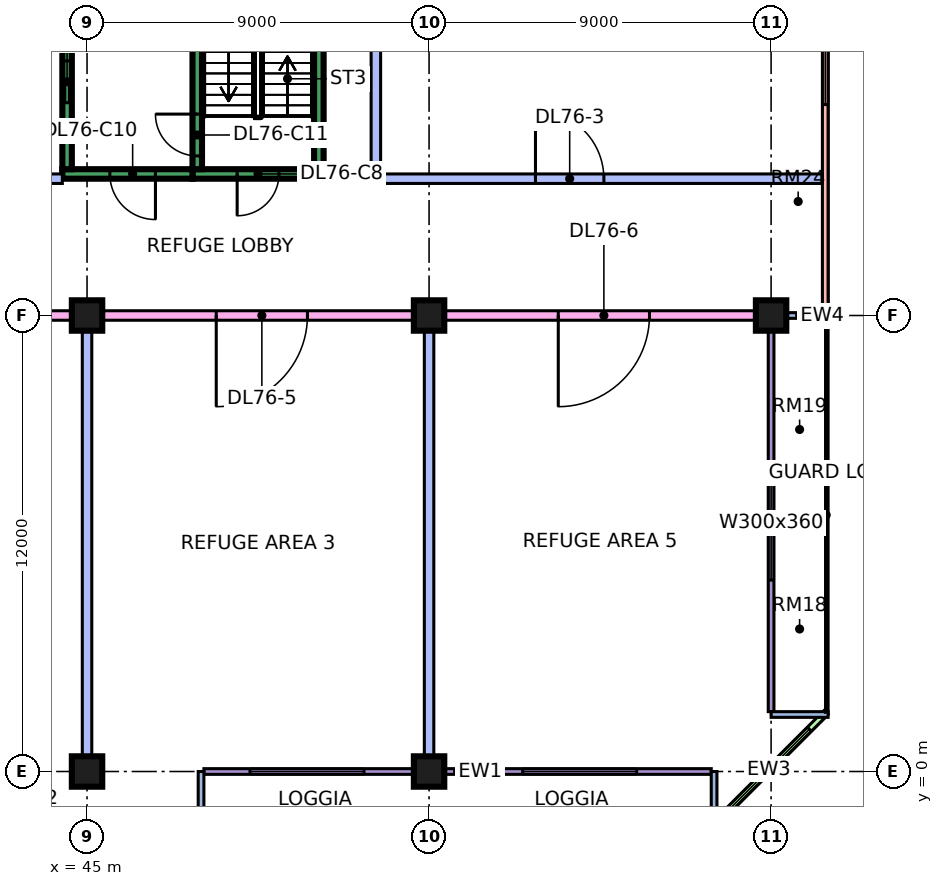
"""IFC4 building model, lengths in metres.
Left out: names, types, materials, properties, quantities, classifications, styles, units other than length and angle.
Written with IfcOpenShell. Run it as: python <this file> out.ifc"""

import sys

from ifc_helpers import new_model, si_unit, direction, frame, frame_2d, origin, origin_2d, place, context, subcontext, project, spatial, rectangle, extrude, element, fill, save


model = new_model("IFC4")
c1 = context("Model", 3, precision=1e-05, world=origin(), true_north=direction((0.0, 1.0)))
c2 = subcontext(c1, "Body", "Model", "MODEL_VIEW")
j1 = project(units=[si_unit("LENGTHUNIT", "METRE"), si_unit("PLANEANGLEUNIT", "RADIAN")], contexts=[c1])
p1 = place(None, origin())
s1 = spatial("IfcSite", under=j1, at=p1, CompositionType="ELEMENT")
p2 = place(p1, origin())
s2 = spatial("IfcBuilding", under=s1, at=p2, CompositionType="ELEMENT")
p3 = place(p2, frame((0.0, 0.0, 322.15)))
s3 = spatial("IfcBuildingStorey", under=s2, at=p3, CompositionType="ELEMENT", Elevation=322.15)
for number, where, z_axis, x_axis in (
    (1, (45.0, 0.0, 0.0), (0.0, 0.0, 1.0), (1.0, 0.0, 0.0)),
    (2, (45.0, 12.0, 0.0), (0.0, 0.0, 1.0), (1.0, 0.0, 0.0)),
    (3, (54.0, 0.0, 0.0), (0.0, 0.0, 1.0), (1.0, 0.0, 0.0)),
    (4, (54.0, 12.0, 0.0), (0.0, 0.0, 1.0), (1.0, 0.0, 0.0)),
    (5, (63.0, 12.0, 0.0), (0.0, 0.0, 1.0), (1.0, 0.0, 0.0)),
):
    element("IfcColumn", number, at=place(p3, frame(where, z_axis=z_axis, x_axis=x_axis)), inside=s3, PredefinedType="COLUMN", context=c2, shape_type="SweptSolid", body=[
        extrude(rectangle(XDim=0.8, YDim=0.8, at=origin_2d()), origin(), (0.0, 0.0, 1.0), 5.5),
    ])
p4 = place(p3, frame((47.775, 15.725, 0.0), z_axis=(0.0, 0.0, 1.0), x_axis=(1.0, 0.0, 0.0)))
e6 = element("IfcWall", 6, at=p4, inside=s3, PredefinedType="SHEAR", context=c2, shape_type="SweptSolid", body=[
    extrude(rectangle(XDim=3.45, YDim=0.25, at=frame_2d((1.725, 0.0))), origin(), (0.0, 0.0, 1.0), 5.5),
])
p5 = place(p4, frame((1.175, 0.0, 0.0)))
e7 = element("IfcOpeningElement", 7, at=p5, cuts=e6, PredefinedType="OPENING", context=c2, shape_type="SweptSolid", body=[
    extrude(rectangle(XDim=1.1, YDim=2.2, at=frame_2d((0.55, 1.1))), frame((0.0, 0.135, 0.0), z_axis=(0.0, -1.0, 0.0), x_axis=(1.0, 0.0, 0.0)), (0.0, 0.0, 1.0), 0.27),
])
p6 = place(p3, frame((47.9, 15.85, 0.0), z_axis=(0.0, 0.0, 1.0), x_axis=(0.0, 1.0, 0.0)))
e8 = element("IfcWall", 8, at=p6, inside=s3, PredefinedType="SHEAR", context=c2, shape_type="SweptSolid", body=[
    extrude(rectangle(XDim=6.5, YDim=0.25, at=frame_2d((3.25, 0.0))), origin(), (0.0, 0.0, 1.0), 5.5),
])
p7 = place(p6, frame((0.35, 0.0, 0.0)))
e9 = element("IfcOpeningElement", 9, at=p7, cuts=e8, PredefinedType="OPENING", context=c2, shape_type="SweptSolid", body=[
    extrude(rectangle(XDim=1.1, YDim=2.2, at=frame_2d((0.55, 1.1))), frame((0.0, 0.135, 0.0), z_axis=(0.0, -1.0, 0.0), x_axis=(1.0, 0.0, 0.0)), (0.0, 0.0, 1.0), 0.27),
])
p8 = place(p3, frame((51.1, 15.85, 0.0), z_axis=(0.0, 0.0, 1.0), x_axis=(0.0, 1.0, 0.0)))
e10 = element("IfcWall", 10, at=p8, inside=s3, PredefinedType="SHEAR", context=c2, shape_type="SweptSolid", body=[
    extrude(rectangle(XDim=6.5, YDim=0.25, at=frame_2d((3.25, 0.0))), origin(), (0.0, 0.0, 1.0), 5.5),
])
p9 = place(p3, frame((44.35, 15.725, 0.0), z_axis=(0.0, 0.0, 1.0), x_axis=(1.0, 0.0, 0.0)))
e11 = element("IfcWall", 11, at=p9, inside=s3, PredefinedType="SHEAR", context=c2, shape_type="SweptSolid", body=[
    extrude(rectangle(XDim=3.425, YDim=0.25, at=frame_2d((1.712, 0.0))), origin(), (0.0, 0.0, 1.0), 5.5),
])
p10 = place(p9, frame((1.25, 0.0, 0.0)))
e12 = element("IfcOpeningElement", 12, at=p10, cuts=e11, PredefinedType="OPENING", context=c2, shape_type="SweptSolid", body=[
    extrude(rectangle(XDim=1.2, YDim=2.2, at=frame_2d((0.6, 1.1))), frame((0.0, 0.135, 0.0), z_axis=(0.0, -1.0, 0.0), x_axis=(1.0, 0.0, 0.0)), (0.0, 0.0, 1.0), 0.27),
])
p11 = place(p3, frame((44.475, 15.85, 0.0), z_axis=(0.0, 0.0, 1.0), x_axis=(0.0, 1.0, 0.0)))
e13 = element("IfcWall", 13, at=p11, inside=s3, PredefinedType="SHEAR", context=c2, shape_type="SweptSolid", body=[
    extrude(rectangle(XDim=6.5, YDim=0.25, at=frame_2d((3.25, 0.0))), origin(), (0.0, 0.0, 1.0), 5.5),
])
p12 = place(p11, frame((1.75, 0.0, 0.0)))
e14 = element("IfcOpeningElement", 14, at=p12, cuts=e13, PredefinedType="OPENING", context=c2, shape_type="SweptSolid", body=[
    extrude(rectangle(XDim=1.1, YDim=2.2, at=frame_2d((0.55, 1.1))), frame((0.0, 0.135, 0.0), z_axis=(0.0, -1.0, 0.0), x_axis=(1.0, 0.0, 0.0)), (0.0, 0.0, 1.0), 0.27),
])
p13 = place(p11, frame((4.3, 0.0, 0.0)))
e15 = element("IfcOpeningElement", 15, at=p13, cuts=e13, PredefinedType="OPENING", context=c2, shape_type="SweptSolid", body=[
    extrude(rectangle(XDim=1.1, YDim=2.2, at=frame_2d((0.55, 1.1))), frame((0.0, 0.135, 0.0), z_axis=(0.0, -1.0, 0.0), x_axis=(1.0, 0.0, 0.0)), (0.0, 0.0, 1.0), 0.27),
])
p14 = place(p3, frame((41.5, 16.875, 0.0), z_axis=(0.0, 0.0, 1.0), x_axis=(1.0, 0.0, 0.0)))
e16 = element("IfcWall", 16, at=p14, inside=s3, PredefinedType="SHEAR", context=c2, shape_type="SweptSolid", body=[
    extrude(rectangle(XDim=2.85, YDim=0.25, at=frame_2d((1.425, 0.0))), origin(), (0.0, 0.0, 1.0), 5.5),
])
p15 = place(p3, frame((48.075, 0.0, 0.0), z_axis=(0.0, 0.0, 1.0), x_axis=(1.0, 0.0, 0.0)))
e17 = element("IfcWall", 17, at=p15, inside=s3, PredefinedType="SOLIDWALL", context=c2, shape_type="SweptSolid", body=[
    extrude(rectangle(XDim=13.35, YDim=0.15, at=frame_2d((6.675, 0.0))), origin(), (0.0, 0.0, 1.0), 5.05),
])
p16 = place(p15, frame((1.212, 0.0, 0.45)))
e18 = element("IfcOpeningElement", 18, at=p16, cuts=e17, PredefinedType="OPENING", context=c2, shape_type="SweptSolid", body=[
    extrude(rectangle(XDim=3.0, YDim=3.6, at=frame_2d((1.5, 1.8))), frame((0.0, 0.085, 0.0), z_axis=(0.0, -1.0, 0.0), x_axis=(1.0, 0.0, 0.0)), (0.0, 0.0, 1.0), 0.17),
])
p17 = place(p15, frame((8.387, 0.0, 0.45)))
e19 = element("IfcOpeningElement", 19, at=p17, cuts=e17, PredefinedType="OPENING", context=c2, shape_type="SweptSolid", body=[
    extrude(rectangle(XDim=3.0, YDim=3.6, at=frame_2d((1.5, 1.8))), frame((0.0, 0.085, 0.0), z_axis=(0.0, -1.0, 0.0), x_axis=(1.0, 0.0, 0.0)), (0.0, 0.0, 1.0), 0.17),
])
for number, where, z_axis, x_axis in (
    (20, (48.0, -1.5, 0.0), (0.0, 0.0, 1.0), (0.0, 1.0, 0.0)),
    (21, (61.5, -1.5, 0.0), (0.0, 0.0, 1.0), (0.0, 1.0, 0.0)),
):
    element("IfcWall", number, at=place(p3, frame(where, z_axis=z_axis, x_axis=x_axis)), inside=s3, PredefinedType="SOLIDWALL", context=c2, shape_type="SweptSolid", body=[
        extrude(rectangle(XDim=1.5, YDim=0.15, at=frame_2d((0.75, 0.0))), origin(), (0.0, 0.0, 1.0), 5.05),
    ])
p18 = place(p3, frame((61.447, -1.447, 0.0), z_axis=(0.0, 0.0, 1.0), x_axis=(0.707106781187, 0.707106781187, 0.0)))
e22 = element("IfcWall", 22, at=p18, inside=s3, PredefinedType="SOLIDWALL", context=c2, shape_type="SweptSolid", body=[
    extrude(rectangle(XDim=4.243, YDim=0.15, at=frame_2d((2.121, 0.0))), origin(), (0.0, 0.0, 1.0), 5.05),
])
p19 = place(p18, frame((0.621, 0.0, 0.45)))
e23 = element("IfcOpeningElement", 23, at=p19, cuts=e22, PredefinedType="OPENING", context=c2, shape_type="SweptSolid", body=[
    extrude(rectangle(XDim=3.0, YDim=3.6, at=frame_2d((1.5, 1.8))), frame((0.0, 0.085, 0.0), z_axis=(0.0, -1.0, 0.0), x_axis=(1.0, 0.0, 0.0)), (0.0, 0.0, 1.0), 0.17),
])
p20 = place(p3, frame((63.0, 1.575, 0.0), z_axis=(0.0, 0.0, 1.0), x_axis=(0.0, 1.0, 0.0)))
e24 = element("IfcWall", 24, at=p20, inside=s3, PredefinedType="SOLIDWALL", context=c2, shape_type="SweptSolid", body=[
    extrude(rectangle(XDim=10.35, YDim=0.15, at=frame_2d((5.175, 0.0))), origin(), (0.0, 0.0, 1.0), 5.05),
])
p21 = place(p20, frame((3.462, 0.0, 0.45)))
e25 = element("IfcOpeningElement", 25, at=p21, cuts=e24, PredefinedType="OPENING", context=c2, shape_type="SweptSolid", body=[
    extrude(rectangle(XDim=3.0, YDim=3.6, at=frame_2d((1.5, 1.8))), frame((0.0, 0.085, 0.0), z_axis=(0.0, -1.0, 0.0), x_axis=(1.0, 0.0, 0.0)), (0.0, 0.0, 1.0), 0.17),
])
for number, where, z_axis, x_axis in (
    (26, (64.5, 1.5, 0.0), (0.0, 0.0, 1.0), (-1.0, 0.0, 0.0)),
    (27, (64.5, 12.0, 0.0), (0.0, 0.0, 1.0), (-1.0, 0.0, 0.0)),
):
    element("IfcWall", number, at=place(p3, frame(where, z_axis=z_axis, x_axis=x_axis)), inside=s3, PredefinedType="SOLIDWALL", context=c2, shape_type="SweptSolid", body=[
        extrude(rectangle(XDim=1.5, YDim=0.15, at=frame_2d((0.75, 0.0))), origin(), (0.0, 0.0, 1.0), 5.05),
    ])
p22 = place(p3, frame((64.425, 12.075, 0.0), z_axis=(0.0, 0.0, 1.0), x_axis=(0.0, 1.0, 0.0)))
e28 = element("IfcWall", 28, at=p22, inside=s3, PredefinedType="SOLIDWALL", context=c2, shape_type="SweptSolid", body=[
    extrude(rectangle(XDim=10.425, YDim=0.15, at=frame_2d((5.212, 0.0))), origin(), (0.0, 0.0, 1.0), 5.05),
])
p23 = place(p22, frame((5.475, 0.0, 0.45)))
e29 = element("IfcOpeningElement", 29, at=p23, cuts=e28, PredefinedType="OPENING", context=c2, shape_type="SweptSolid", body=[
    extrude(rectangle(XDim=3.0, YDim=3.6, at=frame_2d((1.5, 1.8))), frame((0.0, 0.085, 0.0), z_axis=(0.0, -1.0, 0.0), x_axis=(1.0, 0.0, 0.0)), (0.0, 0.0, 1.0), 0.17),
])
p24 = place(p3, frame((34.0, 15.6, 0.0), z_axis=(0.0, 0.0, 1.0), x_axis=(1.0, 0.0, 0.0)))
e30 = element("IfcWall", 30, at=p24, inside=s3, PredefinedType="PARTITIONING", context=c2, shape_type="SweptSolid", body=[
    extrude(rectangle(XDim=10.35, YDim=0.25, at=frame_2d((5.175, 0.0))), origin(), (0.0, 0.0, 1.0), 5.05),
])
p25 = place(p24, frame((2.25, 0.0, 0.0)))
e31 = element("IfcOpeningElement", 31, at=p25, cuts=e30, PredefinedType="OPENING", context=c2, shape_type="SweptSolid", body=[
    extrude(rectangle(XDim=1.8, YDim=2.1, at=frame_2d((0.9, 1.05))), frame((0.0, 0.135, 0.0), z_axis=(0.0, -1.0, 0.0), x_axis=(1.0, 0.0, 0.0)), (0.0, 0.0, 1.0), 0.27),
])
p26 = place(p24, frame((7.8, 0.0, 0.0)))
e32 = element("IfcOpeningElement", 32, at=p26, cuts=e30, PredefinedType="OPENING", context=c2, shape_type="SweptSolid", body=[
    extrude(rectangle(XDim=0.9, YDim=2.1, at=frame_2d((0.45, 1.05))), frame((0.0, 0.135, 0.0), z_axis=(0.0, -1.0, 0.0), x_axis=(1.0, 0.0, 0.0)), (0.0, 0.0, 1.0), 0.27),
])
p27 = place(p3, frame((40.65, 12.0, 0.0), z_axis=(0.0, 0.0, 1.0), x_axis=(1.0, 0.0, 0.0)))
e33 = element("IfcWall", 33, at=p27, inside=s3, PredefinedType="PARTITIONING", context=c2, shape_type="SweptSolid", body=[
    extrude(rectangle(XDim=22.35, YDim=0.25, at=frame_2d((11.175, 0.0))), origin(), (0.0, 0.0, 1.0), 2.45),
])
p28 = place(p27, frame((1.4, 0.0, 0.0)))
e34 = element("IfcOpeningElement", 34, at=p28, cuts=e33, PredefinedType="OPENING", context=c2, shape_type="SweptSolid", body=[
    extrude(rectangle(XDim=1.8, YDim=2.1, at=frame_2d((0.9, 1.05))), frame((0.0, 0.135, 0.0), z_axis=(0.0, -1.0, 0.0), x_axis=(1.0, 0.0, 0.0)), (0.0, 0.0, 1.0), 0.27),
])
p29 = place(p27, frame((7.75, 0.0, 0.0)))
e35 = element("IfcOpeningElement", 35, at=p29, cuts=e33, PredefinedType="OPENING", context=c2, shape_type="SweptSolid", body=[
    extrude(rectangle(XDim=2.4, YDim=2.1, at=frame_2d((1.2, 1.05))), frame((0.0, 0.135, 0.0), z_axis=(0.0, -1.0, 0.0), x_axis=(1.0, 0.0, 0.0)), (0.0, 0.0, 1.0), 0.27),
])
p30 = place(p27, frame((16.75, 0.0, 0.0)))
e36 = element("IfcOpeningElement", 36, at=p30, cuts=e33, PredefinedType="OPENING", context=c2, shape_type="SweptSolid", body=[
    extrude(rectangle(XDim=2.4, YDim=2.1, at=frame_2d((1.2, 1.05))), frame((0.0, 0.135, 0.0), z_axis=(0.0, -1.0, 0.0), x_axis=(1.0, 0.0, 0.0)), (0.0, 0.0, 1.0), 0.27),
])
p31 = place(p3, frame((45.0, 0.0, 0.0), z_axis=(0.0, 0.0, 1.0), x_axis=(0.0, 1.0, 0.0)))
e37 = element("IfcWall", 37, at=p31, inside=s3, PredefinedType="PARTITIONING", context=c2, shape_type="SweptSolid", body=[
    extrude(rectangle(XDim=11.875, YDim=0.25, at=frame_2d((5.938, 0.0))), origin(), (0.0, 0.0, 1.0), 5.05),
])
p32 = place(p3, frame((51.225, 15.6, 0.0), z_axis=(0.0, 0.0, 1.0), x_axis=(1.0, 0.0, 0.0)))
e38 = element("IfcWall", 38, at=p32, inside=s3, PredefinedType="PARTITIONING", context=c2, shape_type="SweptSolid", body=[
    extrude(rectangle(XDim=13.125, YDim=0.25, at=frame_2d((6.562, 0.0))), origin(), (0.0, 0.0, 1.0), 5.05),
])
p33 = place(p32, frame((5.575, 0.0, 0.0)))
e39 = element("IfcOpeningElement", 39, at=p33, cuts=e38, PredefinedType="OPENING", context=c2, shape_type="SweptSolid", body=[
    extrude(rectangle(XDim=1.8, YDim=2.1, at=frame_2d((0.9, 1.05))), frame((0.0, 0.135, 0.0), z_axis=(0.0, -1.0, 0.0), x_axis=(1.0, 0.0, 0.0)), (0.0, 0.0, 1.0), 0.27),
])
p34 = place(p3, frame((52.6, 15.725, 0.0), z_axis=(0.0, 0.0, 1.0), x_axis=(0.0, 1.0, 0.0)))
e40 = element("IfcWall", 40, at=p34, inside=s3, PredefinedType="PARTITIONING", context=c2, shape_type="SweptSolid", body=[
    extrude(rectangle(XDim=8.201, YDim=0.25, at=frame_2d((4.101, 0.0))), origin(), (0.0, 0.0, 1.0), 5.05),
])
p35 = place(p3, frame((54.0, 0.074, 0.0), z_axis=(0.0, 0.0, 1.0), x_axis=(0.0, 1.0, 0.0)))
e41 = element("IfcWall", 41, at=p35, inside=s3, PredefinedType="PARTITIONING", context=c2, shape_type="SweptSolid", body=[
    extrude(rectangle(XDim=11.801, YDim=0.25, at=frame_2d((5.9, 0.0))), origin(), (0.0, 0.0, 1.0), 5.05),
])
p36 = place(p16, origin())
e42 = element("IfcWindow", 42, at=p36, inside=s3, PartitioningType="SINGLE_PANEL", PredefinedType="WINDOW", context=c2, shape_type="SweptSolid", body=[
    extrude(rectangle(XDim=3.0, YDim=3.6, at=frame_2d((1.5, 1.8))), frame((0.0, 0.03, 0.0), z_axis=(0.0, -1.0, 0.0), x_axis=(1.0, 0.0, 0.0)), (0.0, 0.0, 1.0), 0.06),
])
fill(e18, e42)
p37 = place(p17, origin())
e43 = element("IfcWindow", 43, at=p37, inside=s3, PartitioningType="SINGLE_PANEL", PredefinedType="WINDOW", context=c2, shape_type="SweptSolid", body=[
    extrude(rectangle(XDim=3.0, YDim=3.6, at=frame_2d((1.5, 1.8))), frame((0.0, 0.03, 0.0), z_axis=(0.0, -1.0, 0.0), x_axis=(1.0, 0.0, 0.0)), (0.0, 0.0, 1.0), 0.06),
])
fill(e19, e43)
p38 = place(p19, origin())
e44 = element("IfcWindow", 44, at=p38, inside=s3, PartitioningType="SINGLE_PANEL", PredefinedType="WINDOW", context=c2, shape_type="SweptSolid", body=[
    extrude(rectangle(XDim=3.0, YDim=3.6, at=frame_2d((1.5, 1.8))), frame((0.0, 0.03, 0.0), z_axis=(0.0, -1.0, 0.0), x_axis=(1.0, 0.0, 0.0)), (0.0, 0.0, 1.0), 0.06),
])
fill(e23, e44)
p39 = place(p21, origin())
e45 = element("IfcWindow", 45, at=p39, inside=s3, PartitioningType="SINGLE_PANEL", PredefinedType="WINDOW", context=c2, shape_type="SweptSolid", body=[
    extrude(rectangle(XDim=3.0, YDim=3.6, at=frame_2d((1.5, 1.8))), frame((0.0, 0.03, 0.0), z_axis=(0.0, -1.0, 0.0), x_axis=(1.0, 0.0, 0.0)), (0.0, 0.0, 1.0), 0.06),
])
fill(e25, e45)
p40 = place(p23, origin())
e46 = element("IfcWindow", 46, at=p40, inside=s3, PartitioningType="SINGLE_PANEL", PredefinedType="WINDOW", context=c2, shape_type="SweptSolid", body=[
    extrude(rectangle(XDim=3.0, YDim=3.6, at=frame_2d((1.5, 1.8))), frame((0.0, 0.03, 0.0), z_axis=(0.0, -1.0, 0.0), x_axis=(1.0, 0.0, 0.0)), (0.0, 0.0, 1.0), 0.06),
])
fill(e29, e46)
p41 = place(p5, frame((1.1, 0.0, 0.0), z_axis=(0.0, 0.0, 1.0), x_axis=(-1.0, 0.0, 0.0)))
e47 = element("IfcDoor", 47, at=p41, inside=s3, OperationType="SINGLE_SWING_LEFT", PredefinedType="DOOR", context=c2, shape_type="SweptSolid", body=[
    extrude(rectangle(XDim=1.1, YDim=2.2, at=frame_2d((0.55, 1.1))), frame((0.0, 0.025, 0.0), z_axis=(0.0, -1.0, 0.0), x_axis=(1.0, 0.0, 0.0)), (0.0, 0.0, 1.0), 0.05),
])
fill(e7, e47)
p42 = place(p10, origin())
e48 = element("IfcDoor", 48, at=p42, inside=s3, OperationType="SINGLE_SWING_RIGHT", PredefinedType="DOOR", context=c2, shape_type="SweptSolid", body=[
    extrude(rectangle(XDim=1.2, YDim=2.2, at=frame_2d((0.6, 1.1))), frame((0.0, 0.025, 0.0), z_axis=(0.0, -1.0, 0.0), x_axis=(1.0, 0.0, 0.0)), (0.0, 0.0, 1.0), 0.05),
])
fill(e12, e48)
p43 = place(p7, frame((1.1, 0.0, 0.0), z_axis=(0.0, 0.0, 1.0), x_axis=(-1.0, 0.0, 0.0)))
e49 = element("IfcDoor", 49, at=p43, inside=s3, OperationType="SINGLE_SWING_RIGHT", PredefinedType="DOOR", context=c2, shape_type="SweptSolid", body=[
    extrude(rectangle(XDim=1.1, YDim=2.2, at=frame_2d((0.55, 1.1))), frame((0.0, 0.025, 0.0), z_axis=(0.0, -1.0, 0.0), x_axis=(1.0, 0.0, 0.0)), (0.0, 0.0, 1.0), 0.05),
])
fill(e9, e49)
p44 = place(p12, origin())
e50 = element("IfcDoor", 50, at=p44, inside=s3, OperationType="DOUBLE_DOOR_SLIDING", PredefinedType="DOOR", context=c2, shape_type="SweptSolid", body=[
    extrude(rectangle(XDim=1.1, YDim=2.2, at=frame_2d((0.55, 1.1))), frame((0.0, 0.025, 0.0), z_axis=(0.0, -1.0, 0.0), x_axis=(1.0, 0.0, 0.0)), (0.0, 0.0, 1.0), 0.05),
])
fill(e14, e50)
p45 = place(p33, origin())
e51 = element("IfcDoor", 51, at=p45, inside=s3, OperationType="DOUBLE_DOOR_SINGLE_SWING", PredefinedType="DOOR", context=c2, shape_type="SweptSolid", body=[
    extrude(rectangle(XDim=1.8, YDim=2.1, at=frame_2d((0.9, 1.05))), frame((0.0, 0.025, 0.0), z_axis=(0.0, -1.0, 0.0), x_axis=(1.0, 0.0, 0.0)), (0.0, 0.0, 1.0), 0.05),
])
fill(e39, e51)
p46 = place(p29, frame((2.4, 0.0, 0.0), z_axis=(0.0, 0.0, 1.0), x_axis=(-1.0, 0.0, 0.0)))
e52 = element("IfcDoor", 52, at=p46, inside=s3, OperationType="DOUBLE_DOOR_SINGLE_SWING", PredefinedType="DOOR", context=c2, shape_type="SweptSolid", body=[
    extrude(rectangle(XDim=2.4, YDim=2.1, at=frame_2d((1.2, 1.05))), frame((0.0, 0.025, 0.0), z_axis=(0.0, -1.0, 0.0), x_axis=(1.0, 0.0, 0.0)), (0.0, 0.0, 1.0), 0.05),
])
fill(e35, e52)
p47 = place(p30, frame((2.4, 0.0, 0.0), z_axis=(0.0, 0.0, 1.0), x_axis=(-1.0, 0.0, 0.0)))
e53 = element("IfcDoor", 53, at=p47, inside=s3, OperationType="DOUBLE_DOOR_SINGLE_SWING", PredefinedType="DOOR", context=c2, shape_type="SweptSolid", body=[
    extrude(rectangle(XDim=2.4, YDim=2.1, at=frame_2d((1.2, 1.05))), frame((0.0, 0.025, 0.0), z_axis=(0.0, -1.0, 0.0), x_axis=(1.0, 0.0, 0.0)), (0.0, 0.0, 1.0), 0.05),
])
fill(e36, e53)
save(model, sys.argv[1])
